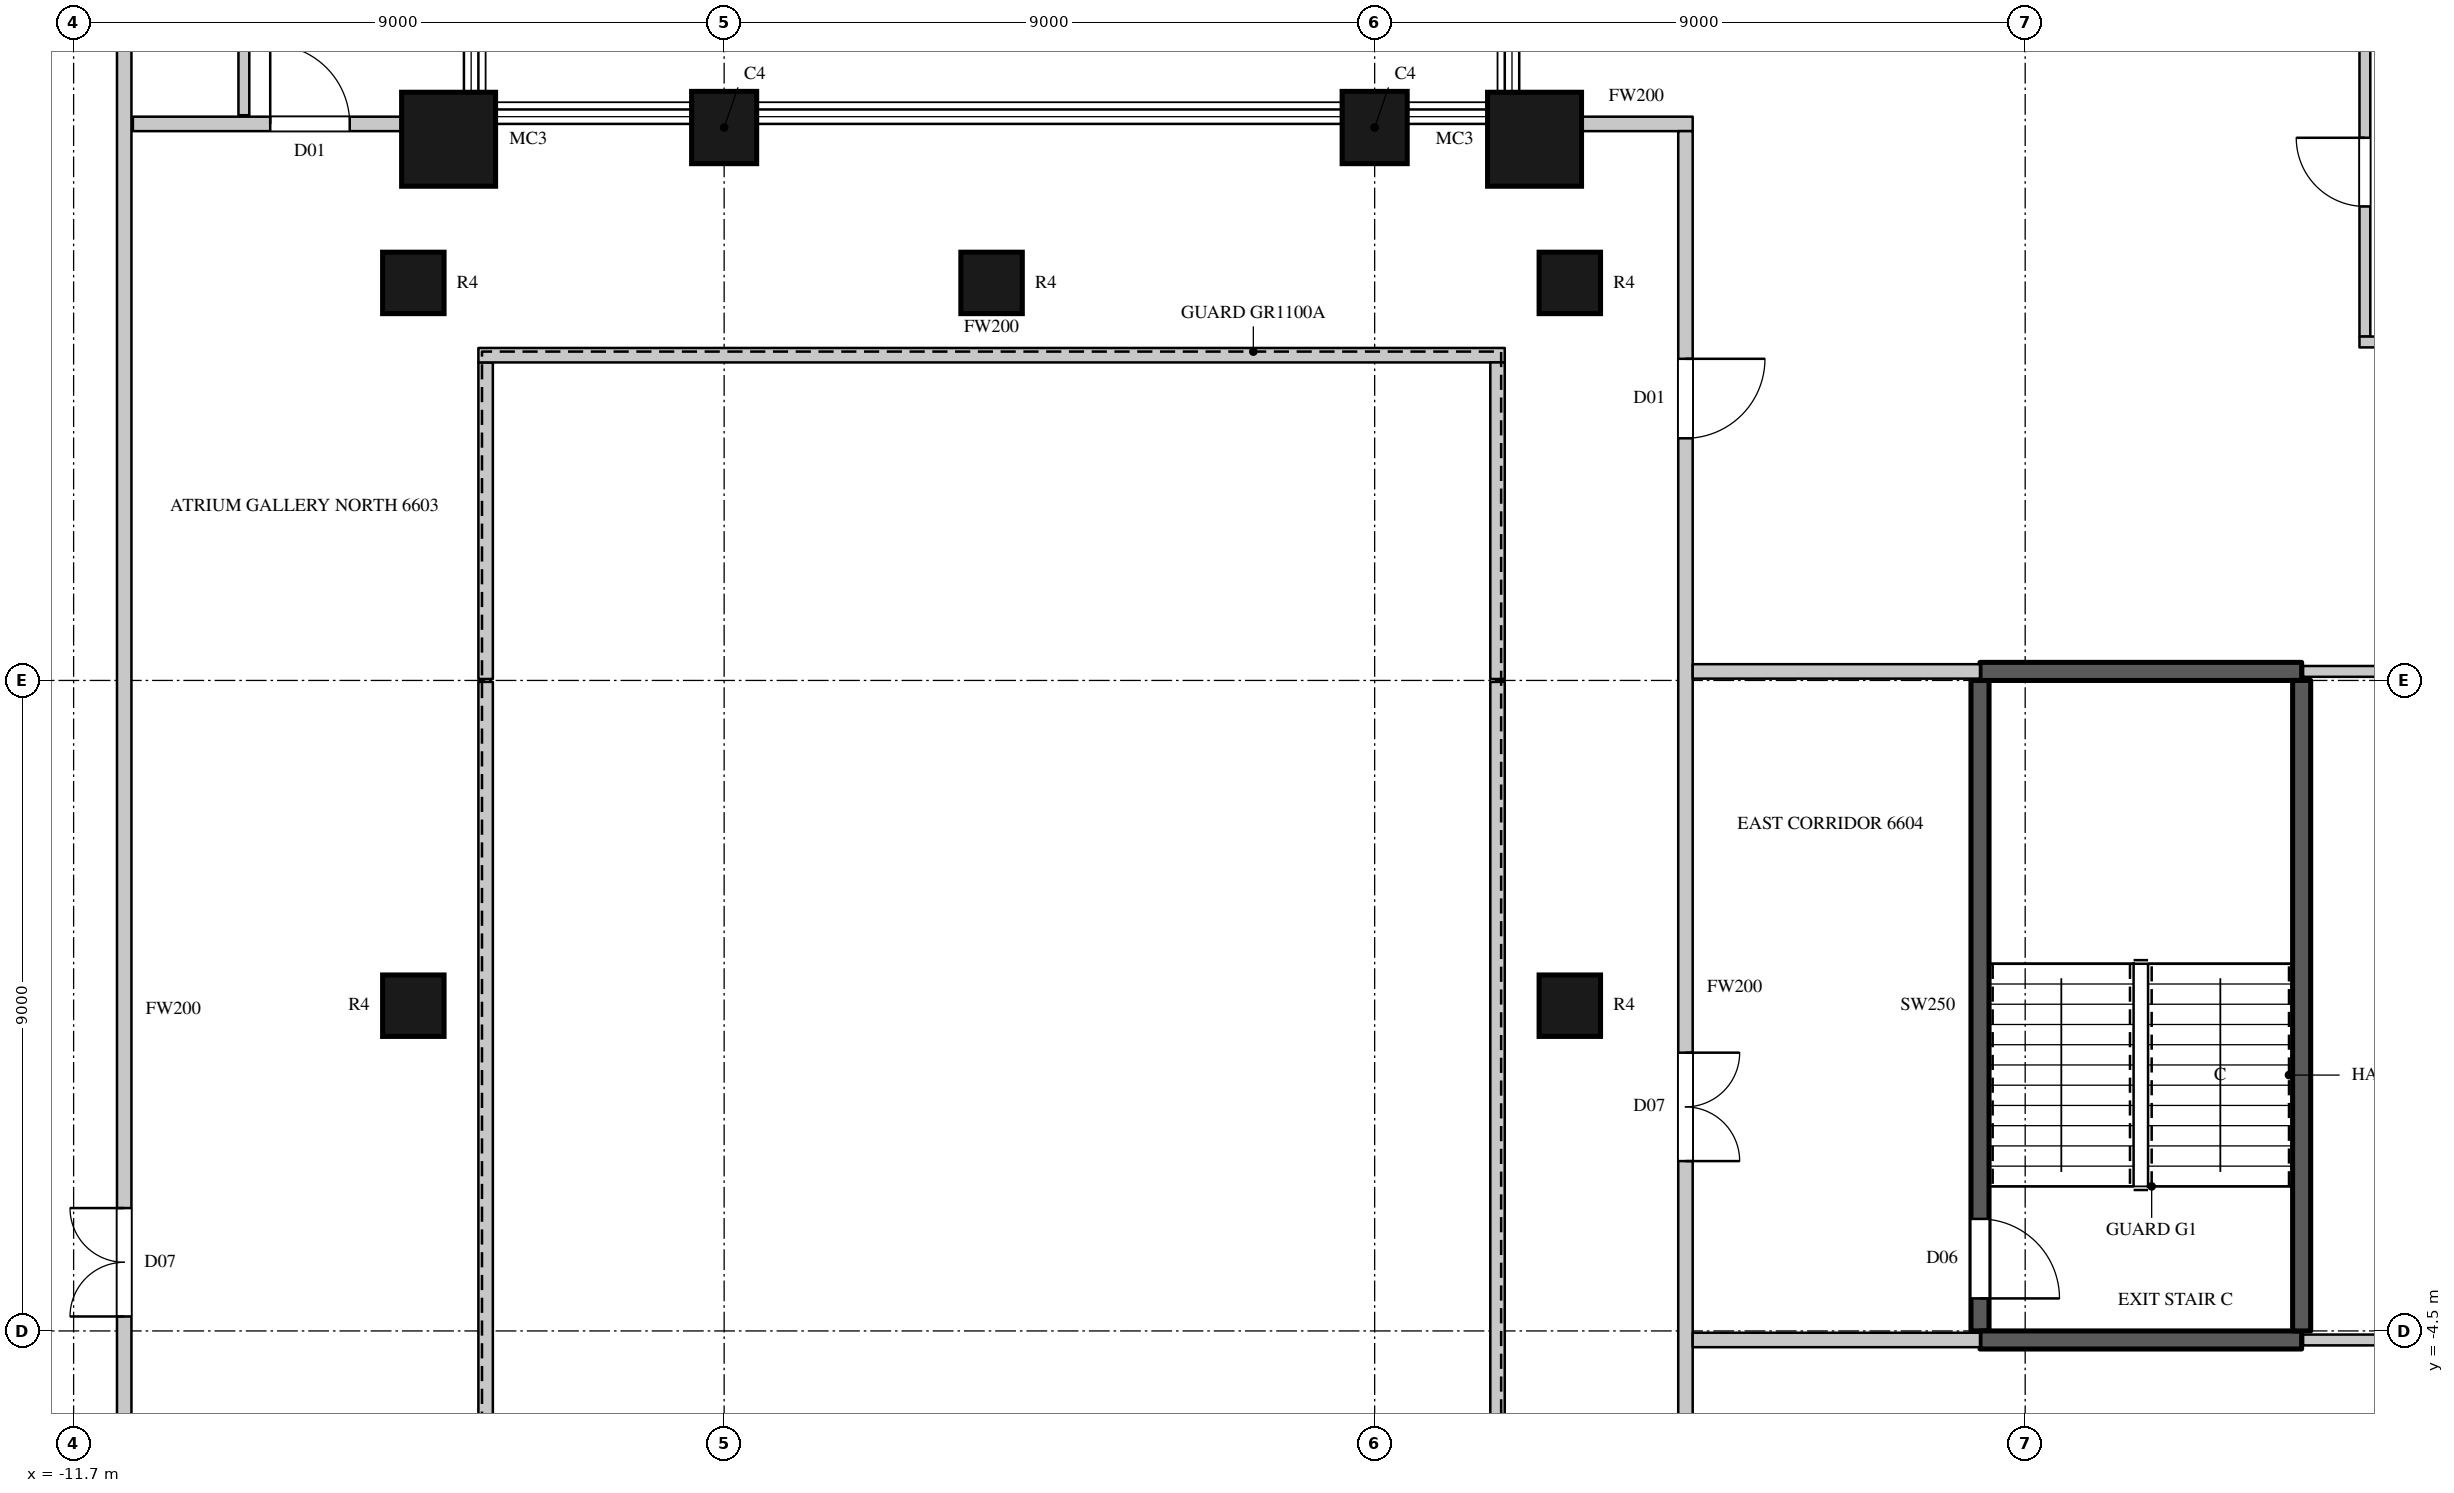
"""IFC4 building model, lengths in metres.
Left out: names, types, materials, properties, quantities, classifications, styles, units other than length and angle.
Written with IfcOpenShell. Run it as: python <this file> out.ifc"""

import sys

from ifc_helpers import new_model, si_unit, direction, frame, frame_2d, origin, origin_2d, place, context, subcontext, project, spatial, rectangle, circle, extrude, element, fill, save


model = new_model("IFC4")
c1 = context("Model", 3, precision=1e-05, world=origin(), true_north=direction((0.0, 1.0)))
c2 = subcontext(c1, "Body", "Model", "MODEL_VIEW")
j1 = project(units=[si_unit("LENGTHUNIT", "METRE"), si_unit("PLANEANGLEUNIT", "RADIAN")], contexts=[c1])
p1 = place(None, origin())
s1 = spatial("IfcSite", under=j1, at=p1, CompositionType="ELEMENT")
p2 = place(p1, origin())
s2 = spatial("IfcBuilding", under=s1, at=p2, CompositionType="ELEMENT")
p3 = place(p2, frame((0.0, 0.0, 292.6)))
s3 = spatial("IfcBuildingStorey", under=s2, at=p3, CompositionType="ELEMENT", Elevation=292.6)
p4 = place(p3, frame((8.512, 11.988, 0.0), z_axis=(0.0, 0.0, 1.0), x_axis=(1.0, 0.0, 0.0)))
e1 = element("IfcColumn", 1, at=p4, inside=s3, PredefinedType="COLUMN", context=c2, shape_type="SweptSolid", body=[
    extrude(circle(Radius=0.65, at=origin_2d()), origin(), (0.0, 0.0, 1.0), 4.1),
])
for number, where, z_axis, x_axis in (
    (2, (6.3, 12.15, 0.0), (0.0, 0.0, 1.0), (-1.0, 0.0, 0.0)),
    (3, (-2.7, 12.15, 0.0), (0.0, 0.0, 1.0), (-1.0, 0.0, 0.0)),
):
    element("IfcColumn", number, at=place(p3, frame(where, z_axis=z_axis, x_axis=x_axis)), inside=s3, PredefinedType="COLUMN", context=c2, shape_type="SweptSolid", body=[
        extrude(rectangle(XDim=0.9, YDim=1.0, at=origin_2d()), origin(), (0.0, 0.0, 1.0), 4.1),
    ])
p5 = place(p3, frame((-6.512, 11.988, 0.0), z_axis=(0.0, 0.0, 1.0), x_axis=(1.0, 0.0, 0.0)))
e4 = element("IfcColumn", 4, at=p5, inside=s3, PredefinedType="COLUMN", context=c2, shape_type="SweptSolid", body=[
    extrude(circle(Radius=0.65, at=origin_2d()), origin(), (0.0, 0.0, 1.0), 4.1),
])
for number, where, z_axis, x_axis in (
    (5, (-7.0, 0.0, 0.0), (0.0, 0.0, 1.0), (1.0, 0.0, 0.0)),
    (6, (-7.0, 10.0, 0.0), (0.0, 0.0, 1.0), (1.0, 0.0, 0.0)),
    (7, (1.0, 10.0, 0.0), (0.0, 0.0, 1.0), (1.0, 0.0, 0.0)),
    (8, (9.0, 0.0, 0.0), (0.0, 0.0, 1.0), (1.0, 0.0, 0.0)),
    (9, (9.0, 10.0, 0.0), (0.0, 0.0, 1.0), (1.0, 0.0, 0.0)),
):
    element("IfcColumn", number, at=place(p3, frame(where, z_axis=z_axis, x_axis=x_axis)), inside=s3, PredefinedType="COLUMN", context=c2, shape_type="SweptSolid", body=[
        extrude(circle(Radius=0.425, at=origin_2d()), origin(), (0.0, 0.0, 1.0), 4.1),
    ])
p6 = place(p3, frame((-11.0, -14.8, 0.0), z_axis=(0.0, 0.0, 1.0), x_axis=(0.0, 1.0, 0.0)))
e10 = element("IfcWall", 10, at=p6, inside=s3, PredefinedType="PARTITIONING", context=c2, shape_type="SweptSolid", body=[
    extrude(rectangle(XDim=29.5, YDim=0.2, at=frame_2d((14.75, 0.0))), origin(), (0.0, 0.0, 1.0), 3.8),
])
p7 = place(p6, frame((10.5, 0.0, 0.0)))
e11 = element("IfcOpeningElement", 11, at=p7, cuts=e10, PredefinedType="OPENING", context=c2, shape_type="SweptSolid", body=[
    extrude(rectangle(XDim=1.5, YDim=2.4, at=frame_2d((0.75, 1.2))), frame((0.0, 0.11, 0.0), z_axis=(0.0, -1.0, 0.0), x_axis=(1.0, 0.0, 0.0)), (0.0, 0.0, 1.0), 0.22),
])
p8 = place(p3, frame((-10.88, 12.2, 0.0), z_axis=(0.0, 0.0, 1.0), x_axis=(1.0, 0.0, 0.0)))
e12 = element("IfcWall", 12, at=p8, inside=s3, PredefinedType="PARTITIONING", context=c2, shape_type="SweptSolid", body=[
    extrude(rectangle(XDim=3.736, YDim=0.2, at=frame_2d((1.868, 0.0))), origin(), (0.0, 0.0, 1.0), 3.8),
])
p9 = place(p8, frame((1.9, 0.0, 0.0)))
e13 = element("IfcOpeningElement", 13, at=p9, cuts=e12, PredefinedType="OPENING", context=c2, shape_type="SweptSolid", body=[
    extrude(rectangle(XDim=1.1, YDim=2.4, at=frame_2d((0.55, 1.2))), frame((0.0, 0.11, 0.0), z_axis=(0.0, -1.0, 0.0), x_axis=(1.0, 0.0, 0.0)), (0.0, 0.0, 1.0), 0.22),
])
p10 = place(p3, frame((-6.0, -8.9, 0.0), z_axis=(0.0, 0.0, 1.0), x_axis=(0.0, 1.0, 0.0)))
e14 = element("IfcWall", 14, at=p10, inside=s3, PredefinedType="PARTITIONING", context=c2, shape_type="SweptSolid", body=[
    extrude(rectangle(XDim=13.38, YDim=0.2, at=frame_2d((6.69, 0.0))), origin(), (0.0, 0.0, 1.0), 3.8),
])
p11 = place(p3, frame((-6.0, 4.52, 0.0), z_axis=(0.0, 0.0, 1.0), x_axis=(0.0, 1.0, 0.0)))
e15 = element("IfcWall", 15, at=p11, inside=s3, PredefinedType="PARTITIONING", context=c2, shape_type="SweptSolid", body=[
    extrude(rectangle(XDim=4.38, YDim=0.2, at=frame_2d((2.19, 0.0))), origin(), (0.0, 0.0, 1.0), 3.8),
])
p12 = place(p3, frame((-6.1, 9.0, 0.0), z_axis=(0.0, 0.0, 1.0), x_axis=(1.0, 0.0, 0.0)))
e16 = element("IfcWall", 16, at=p12, inside=s3, PredefinedType="PARTITIONING", context=c2, shape_type="SweptSolid", body=[
    extrude(rectangle(XDim=14.2, YDim=0.2, at=frame_2d((7.1, 0.0))), origin(), (0.0, 0.0, 1.0), 3.8),
])
p13 = place(p3, frame((8.0, -8.9, 0.0), z_axis=(0.0, 0.0, 1.0), x_axis=(0.0, 1.0, 0.0)))
e17 = element("IfcWall", 17, at=p13, inside=s3, PredefinedType="PARTITIONING", context=c2, shape_type="SweptSolid", body=[
    extrude(rectangle(XDim=13.38, YDim=0.2, at=frame_2d((6.69, 0.0))), origin(), (0.0, 0.0, 1.0), 3.8),
])
p14 = place(p3, frame((8.0, 4.52, 0.0), z_axis=(0.0, 0.0, 1.0), x_axis=(0.0, 1.0, 0.0)))
e18 = element("IfcWall", 18, at=p14, inside=s3, PredefinedType="PARTITIONING", context=c2, shape_type="SweptSolid", body=[
    extrude(rectangle(XDim=4.38, YDim=0.2, at=frame_2d((2.19, 0.0))), origin(), (0.0, 0.0, 1.0), 3.8),
])
p15 = place(p3, frame((9.144, 12.2, 0.0), z_axis=(0.0, 0.0, 1.0), x_axis=(1.0, 0.0, 0.0)))
e19 = element("IfcWall", 19, at=p15, inside=s3, PredefinedType="PARTITIONING", context=c2, shape_type="SweptSolid", body=[
    extrude(rectangle(XDim=1.556, YDim=0.2, at=frame_2d((0.778, 0.0))), origin(), (0.0, 0.0, 1.0), 3.8),
])
p16 = place(p3, frame((10.6, -11.6, 0.0), z_axis=(0.0, 0.0, 1.0), x_axis=(0.0, 1.0, 0.0)))
e20 = element("IfcWall", 20, at=p16, inside=s3, PredefinedType="PARTITIONING", context=c2, shape_type="SweptSolid", body=[
    extrude(rectangle(XDim=23.7, YDim=0.2, at=frame_2d((11.85, 0.0))), origin(), (0.0, 0.0, 1.0), 3.8),
])
p17 = place(p16, frame((9.45, 0.0, 0.0)))
e21 = element("IfcOpeningElement", 21, at=p17, cuts=e20, PredefinedType="OPENING", context=c2, shape_type="SweptSolid", body=[
    extrude(rectangle(XDim=1.5, YDim=2.4, at=frame_2d((0.75, 1.2))), frame((0.0, 0.11, 0.0), z_axis=(0.0, -1.0, 0.0), x_axis=(1.0, 0.0, 0.0)), (0.0, 0.0, 1.0), 0.22),
])
p18 = place(p16, frame((19.45, 0.0, 0.0)))
e22 = element("IfcOpeningElement", 22, at=p18, cuts=e20, PredefinedType="OPENING", context=c2, shape_type="SweptSolid", body=[
    extrude(rectangle(XDim=1.1, YDim=2.4, at=frame_2d((0.55, 1.2))), frame((0.0, 0.11, 0.0), z_axis=(0.0, -1.0, 0.0), x_axis=(1.0, 0.0, 0.0)), (0.0, 0.0, 1.0), 0.22),
])
p19 = place(p16, frame((4.6, 0.0, 0.0)))
e23 = element("IfcOpeningElement", 23, at=p19, cuts=e20, PredefinedType="OPENING", context=c2, shape_type="SweptSolid", body=[
    extrude(rectangle(XDim=1.1, YDim=2.4, at=frame_2d((0.55, 1.2))), frame((0.0, 0.11, 0.0), z_axis=(0.0, -1.0, 0.0), x_axis=(1.0, 0.0, 0.0)), (0.0, 0.0, 1.0), 0.22),
])
for number, where, z_axis, x_axis in (
    (24, (10.7, -4.625, 0.0), (0.0, 0.0, 1.0), (1.0, 0.0, 0.0)),
    (25, (10.7, 4.625, 0.0), (0.0, 0.0, 1.0), (1.0, 0.0, 0.0)),
):
    element("IfcWall", number, at=place(p3, frame(where, z_axis=z_axis, x_axis=x_axis)), inside=s3, PredefinedType="PARTITIONING", context=c2, shape_type="SweptSolid", body=[
        extrude(rectangle(XDim=3.975, YDim=0.2, at=frame_2d((1.988, 0.0))), origin(), (0.0, 0.0, 1.0), 3.8),
    ])
p20 = place(p3, frame((-9.344, 12.32, 0.0), z_axis=(0.0, 0.0, 1.0), x_axis=(0.0, 1.0, 0.0)))
e26 = element("IfcWall", 26, at=p20, inside=s3, PredefinedType="PARTITIONING", context=c2, shape_type="SweptSolid", body=[
    extrude(rectangle(XDim=12.675, YDim=0.15, at=frame_2d((6.338, 0.0))), origin(), (0.0, 0.0, 1.0), 3.8),
])
for number, where, z_axis, x_axis in (
    (27, (19.145, -4.625, 0.0), (0.0, 0.0, 1.0), (1.0, 0.0, 0.0)),
    (28, (19.145, 4.625, 0.0), (0.0, 0.0, 1.0), (1.0, 0.0, 0.0)),
):
    element("IfcWall", number, at=place(p3, frame(where, z_axis=z_axis, x_axis=x_axis)), inside=s3, PredefinedType="PARTITIONING", context=c2, shape_type="SweptSolid", body=[
        extrude(rectangle(XDim=4.605, YDim=0.15, at=frame_2d((2.302, 0.0))), origin(), (0.0, 0.0, 1.0), 3.8),
    ])
p21 = place(p3, frame((20.0, 9.258, 0.0), z_axis=(0.0, 0.0, 1.0), x_axis=(0.0, 1.0, 0.0)))
e29 = element("IfcWall", 29, at=p21, inside=s3, PredefinedType="PARTITIONING", context=c2, shape_type="SweptSolid", body=[
    extrude(rectangle(XDim=4.532, YDim=0.15, at=frame_2d((2.266, 0.0))), origin(), (0.0, 0.0, 1.0), 3.8),
])
p22 = place(p21, frame((1.8, 0.0, 0.0)))
e30 = element("IfcOpeningElement", 30, at=p22, cuts=e29, PredefinedType="OPENING", context=c2, shape_type="SweptSolid", body=[
    extrude(rectangle(XDim=0.95, YDim=2.2, at=frame_2d((0.475, 1.1))), frame((0.0, 0.085, 0.0), z_axis=(0.0, -1.0, 0.0), x_axis=(1.0, 0.0, 0.0)), (0.0, 0.0, 1.0), 0.17),
])
p23 = place(p3, frame((19.925, 9.183, 0.0), z_axis=(0.0, 0.0, 1.0), x_axis=(1.0, 0.0, 0.0)))
e31 = element("IfcWall", 31, at=p23, inside=s3, PredefinedType="PARTITIONING", context=c2, shape_type="SweptSolid", body=[
    extrude(rectangle(XDim=4.375, YDim=0.15, at=frame_2d((2.188, 0.0))), origin(), (0.0, 0.0, 1.0), 3.15),
])
p24 = place(p3, frame((14.675, -4.5, 0.0), z_axis=(0.0, 0.0, 1.0), x_axis=(0.0, 1.0, 0.0)))
e32 = element("IfcWall", 32, at=p24, inside=s3, PredefinedType="SHEAR", context=c2, shape_type="SweptSolid", body=[
    extrude(rectangle(XDim=9.0, YDim=0.25, at=frame_2d((4.5, 0.0))), origin(), (0.0, 0.0, 1.0), 3.8),
])
p25 = place(p24, frame((0.45, 0.0, 0.0)))
e33 = element("IfcOpeningElement", 33, at=p25, cuts=e32, PredefinedType="OPENING", context=c2, shape_type="SweptSolid", body=[
    extrude(rectangle(XDim=1.1, YDim=2.2, at=frame_2d((0.55, 1.1))), frame((0.0, 0.135, 0.0), z_axis=(0.0, -1.0, 0.0), x_axis=(1.0, 0.0, 0.0)), (0.0, 0.0, 1.0), 0.27),
])
for number, where, z_axis, x_axis in (
    (34, (14.675, -4.625, 0.0), (0.0, 0.0, 1.0), (1.0, 0.0, 0.0)),
    (35, (14.675, 4.625, 0.0), (0.0, 0.0, 1.0), (1.0, 0.0, 0.0)),
):
    element("IfcWall", number, at=place(p3, frame(where, z_axis=z_axis, x_axis=x_axis)), inside=s3, PredefinedType="SHEAR", context=c2, shape_type="SweptSolid", body=[
        extrude(rectangle(XDim=4.45, YDim=0.25, at=frame_2d((2.225, 0.0))), origin(), (0.0, 0.0, 1.0), 3.8),
    ])
p26 = place(p3, frame((19.125, -4.5, 0.0), z_axis=(0.0, 0.0, 1.0), x_axis=(0.0, 1.0, 0.0)))
e36 = element("IfcWall", 36, at=p26, inside=s3, PredefinedType="SHEAR", context=c2, shape_type="SweptSolid", body=[
    extrude(rectangle(XDim=9.0, YDim=0.25, at=frame_2d((4.5, 0.0))), origin(), (0.0, 0.0, 1.0), 3.8),
])
p27 = place(p7, origin())
e37 = element("IfcDoor", 37, at=p27, inside=s3, OperationType="DOUBLE_DOOR_SINGLE_SWING", PredefinedType="DOOR", context=c2, shape_type="SweptSolid", body=[
    extrude(rectangle(XDim=1.5, YDim=2.4, at=frame_2d((0.75, 1.2))), frame((0.0, 0.025, 0.0), z_axis=(0.0, -1.0, 0.0), x_axis=(1.0, 0.0, 0.0)), (0.0, 0.0, 1.0), 0.05),
])
fill(e11, e37)
p28 = place(p17, origin())
e38 = element("IfcDoor", 38, at=p28, inside=s3, OperationType="DOUBLE_DOOR_SINGLE_SWING", PredefinedType="DOOR", context=c2, shape_type="SweptSolid", body=[
    extrude(rectangle(XDim=1.5, YDim=2.4, at=frame_2d((0.75, 1.2))), frame((0.0, 0.025, 0.0), z_axis=(0.0, -1.0, 0.0), x_axis=(1.0, 0.0, 0.0)), (0.0, 0.0, 1.0), 0.05),
])
fill(e21, e38)
p29 = place(p9, origin())
e39 = element("IfcDoor", 39, at=p29, inside=s3, OperationType="SINGLE_SWING_LEFT", PredefinedType="DOOR", context=c2, shape_type="SweptSolid", body=[
    extrude(rectangle(XDim=1.1, YDim=2.4, at=frame_2d((0.55, 1.2))), frame((0.0, 0.025, 0.0), z_axis=(0.0, -1.0, 0.0), x_axis=(1.0, 0.0, 0.0)), (0.0, 0.0, 1.0), 0.05),
])
fill(e13, e39)
p30 = place(p18, origin())
e40 = element("IfcDoor", 40, at=p30, inside=s3, OperationType="SINGLE_SWING_LEFT", PredefinedType="DOOR", context=c2, shape_type="SweptSolid", body=[
    extrude(rectangle(XDim=1.1, YDim=2.4, at=frame_2d((0.55, 1.2))), frame((0.0, 0.025, 0.0), z_axis=(0.0, -1.0, 0.0), x_axis=(1.0, 0.0, 0.0)), (0.0, 0.0, 1.0), 0.05),
])
fill(e22, e40)
p31 = place(p22, origin())
e41 = element("IfcDoor", 41, at=p31, inside=s3, OperationType="SINGLE_SWING_RIGHT", PredefinedType="DOOR", context=c2, shape_type="SweptSolid", body=[
    extrude(rectangle(XDim=0.95, YDim=2.2, at=frame_2d((0.475, 1.1))), frame((0.0, 0.025, 0.0), z_axis=(0.0, -1.0, 0.0), x_axis=(1.0, 0.0, 0.0)), (0.0, 0.0, 1.0), 0.05),
])
fill(e30, e41)
p32 = place(p25, origin())
e42 = element("IfcDoor", 42, at=p32, inside=s3, OperationType="SINGLE_SWING_RIGHT", PredefinedType="DOOR", context=c2, shape_type="SweptSolid", body=[
    extrude(rectangle(XDim=1.1, YDim=2.2, at=frame_2d((0.55, 1.1))), frame((0.0, 0.025, 0.0), z_axis=(0.0, -1.0, 0.0), x_axis=(1.0, 0.0, 0.0)), (0.0, 0.0, 1.0), 0.05),
])
fill(e33, e42)
save(model, sys.argv[1])
